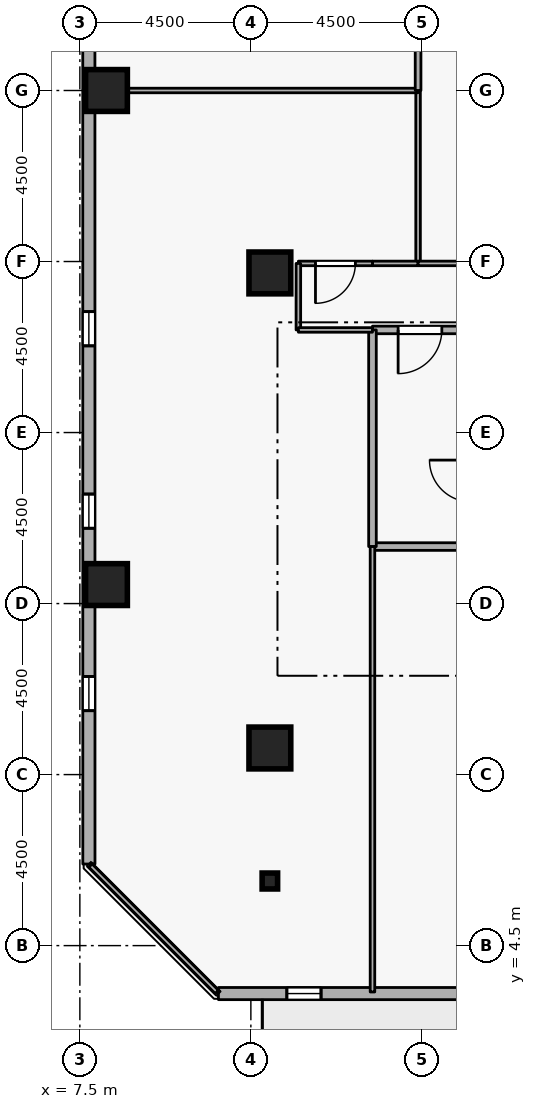
"""IFC4 building model, lengths in metres.
Left out: names, types, materials, properties, quantities, classifications, styles, units other than length and angle.
Written with IfcOpenShell. Run it as: python <this file> out.ifc"""

import sys

from ifc_helpers import new_model, si_unit, direction, frame, frame_2d, origin, origin_2d, place, context, subcontext, project, spatial, rectangle, i_section, extrude, element, fill, save


model = new_model("IFC4")
c1 = context("Model", 3, precision=1e-05, world=origin(), true_north=direction((0.0, 1.0)))
c2 = subcontext(c1, "Body", "Model", "MODEL_VIEW")
j1 = project(units=[si_unit("LENGTHUNIT", "METRE"), si_unit("PLANEANGLEUNIT", "RADIAN")], contexts=[c1])
p1 = place(None, origin())
s1 = spatial("IfcSite", under=j1, at=p1, CompositionType="ELEMENT")
p2 = place(p1, origin())
s2 = spatial("IfcBuilding", under=s1, at=p2, CompositionType="ELEMENT")
p3 = place(p2, frame((0.0, 0.0, 159.9)))
s3 = spatial("IfcBuildingStorey", under=s2, at=p3, CompositionType="ELEMENT", Elevation=159.9)
for number, where, z_axis, x_axis in (
    (1, (12.5, 9.7, 0.0), (0.0, 0.0, 1.0), (1.0, 0.0, 0.0)),
    (2, (8.2, 14.0, 0.0), (0.0, 0.0, 1.0), (1.0, 0.0, 0.0)),
    (3, (8.2, 27.0, 0.0), (0.0, 0.0, 1.0), (1.0, 0.0, 0.0)),
    (4, (12.5, 22.2, 0.0), (0.0, 0.0, 1.0), (1.0, 0.0, 0.0)),
):
    element("IfcColumn", number, at=place(p3, frame(where, z_axis=z_axis, x_axis=x_axis)), inside=s3, PredefinedType="COLUMN", context=c2, shape_type="SweptSolid", body=[
        extrude(rectangle(XDim=1.1, YDim=1.1, at=origin_2d()), origin(), (0.0, 0.0, 1.0), 3.6),
    ])
p4 = place(p3, frame((12.5, 6.2, 0.0), z_axis=(0.0, 0.0, 1.0), x_axis=(1.0, 0.0, 0.0)))
e5 = element("IfcColumn", 5, at=p4, inside=s3, PredefinedType="COLUMN", context=c2, shape_type="SweptSolid", body=[
    extrude(i_section(OverallWidth=0.407, OverallDepth=0.419, WebThickness=0.031, FlangeThickness=0.049, FilletRadius=0.015, at=origin_2d()), origin(), (0.0, 0.0, 1.0), 3.6),
])
p5 = place(p3, frame((11.146, 3.238, 0.0), z_axis=(0.0, 0.0, 1.0), x_axis=(0.999999997144, -7.5574884e-05, 0.0)))
e6 = element("IfcWall", 6, at=p5, inside=s3, PredefinedType="STANDARD", context=c2, shape_type="SweptSolid", body=[
    extrude(rectangle(XDim=35.535, YDim=0.32, at=frame_2d((17.768, 0.0))), origin(), (0.0, 0.0, 1.0), 2.7),
])
p6 = place(p5, frame((22.718, 0.0, 0.0)))
e7 = element("IfcOpeningElement", 7, at=p6, cuts=e6, PredefinedType="OPENING", context=c2, shape_type="SweptSolid", body=[
    extrude(rectangle(XDim=1.0, YDim=2.08, at=frame_2d((0.5, 1.04))), frame((0.0, 0.17, 0.0), z_axis=(0.0, -1.0, 0.0), x_axis=(1.0, 0.0, 0.0)), (0.0, 0.0, 1.0), 0.34),
])
p7 = place(p5, frame((1.8, 0.0, 0.72)))
e8 = element("IfcOpeningElement", 8, at=p7, cuts=e6, PredefinedType="OPENING", context=c2, shape_type="SweptSolid", body=[
    extrude(rectangle(XDim=0.9, YDim=1.75, at=frame_2d((0.45, 0.875))), frame((0.0, 0.17, 0.0), z_axis=(0.0, -1.0, 0.0), x_axis=(1.0, 0.0, 0.0)), (0.0, 0.0, 1.0), 0.34),
])
p8 = place(p5, frame((6.6, 0.0, 0.72)))
e9 = element("IfcOpeningElement", 9, at=p8, cuts=e6, PredefinedType="OPENING", context=c2, shape_type="SweptSolid", body=[
    extrude(rectangle(XDim=0.9, YDim=1.75, at=frame_2d((0.45, 0.875))), frame((0.0, 0.17, 0.0), z_axis=(0.0, -1.0, 0.0), x_axis=(1.0, 0.0, 0.0)), (0.0, 0.0, 1.0), 0.34),
])
p9 = place(p5, frame((11.4, 0.0, 0.72)))
e10 = element("IfcOpeningElement", 10, at=p9, cuts=e6, PredefinedType="OPENING", context=c2, shape_type="SweptSolid", body=[
    extrude(rectangle(XDim=0.9, YDim=1.75, at=frame_2d((0.45, 0.875))), frame((0.0, 0.17, 0.0), z_axis=(0.0, -1.0, 0.0), x_axis=(1.0, 0.0, 0.0)), (0.0, 0.0, 1.0), 0.34),
])
p10 = place(p5, frame((16.2, 0.0, 0.72)))
e11 = element("IfcOpeningElement", 11, at=p10, cuts=e6, PredefinedType="OPENING", context=c2, shape_type="SweptSolid", body=[
    extrude(rectangle(XDim=0.9, YDim=1.75, at=frame_2d((0.45, 0.875))), frame((0.0, 0.17, 0.0), z_axis=(0.0, -1.0, 0.0), x_axis=(1.0, 0.0, 0.0)), (0.0, 0.0, 1.0), 0.34),
])
p11 = place(p5, frame((21.0, 0.0, 0.72)))
e12 = element("IfcOpeningElement", 12, at=p11, cuts=e6, PredefinedType="OPENING", context=c2, shape_type="SweptSolid", body=[
    extrude(rectangle(XDim=0.9, YDim=1.75, at=frame_2d((0.45, 0.875))), frame((0.0, 0.17, 0.0), z_axis=(0.0, -1.0, 0.0), x_axis=(1.0, 0.0, 0.0)), (0.0, 0.0, 1.0), 0.34),
])
p12 = place(p5, frame((25.8, 0.0, 0.72)))
e13 = element("IfcOpeningElement", 13, at=p12, cuts=e6, PredefinedType="OPENING", context=c2, shape_type="SweptSolid", body=[
    extrude(rectangle(XDim=0.9, YDim=1.75, at=frame_2d((0.45, 0.875))), frame((0.0, 0.17, 0.0), z_axis=(0.0, -1.0, 0.0), x_axis=(1.0, 0.0, 0.0)), (0.0, 0.0, 1.0), 0.34),
])
p13 = place(p5, frame((30.6, 0.0, 0.72)))
e14 = element("IfcOpeningElement", 14, at=p13, cuts=e6, PredefinedType="OPENING", context=c2, shape_type="SweptSolid", body=[
    extrude(rectangle(XDim=0.9, YDim=1.75, at=frame_2d((0.45, 0.875))), frame((0.0, 0.17, 0.0), z_axis=(0.0, -1.0, 0.0), x_axis=(1.0, 0.0, 0.0)), (0.0, 0.0, 1.0), 0.34),
])
p14 = place(p3, frame((7.735, 42.181, 0.0), z_axis=(0.0, 0.0, 1.0), x_axis=(7.5574884e-05, -0.999999997144, 0.0)))
e15 = element("IfcWall", 15, at=p14, inside=s3, PredefinedType="STANDARD", context=c2, shape_type="SweptSolid", body=[
    extrude(rectangle(XDim=35.535, YDim=0.32, at=frame_2d((17.768, 0.0))), origin(), (0.0, 0.0, 1.0), 2.7),
])
p15 = place(p14, frame((6.6, 0.0, 0.72)))
e16 = element("IfcOpeningElement", 16, at=p15, cuts=e15, PredefinedType="OPENING", context=c2, shape_type="SweptSolid", body=[
    extrude(rectangle(XDim=0.9, YDim=1.75, at=frame_2d((0.45, 0.875))), frame((0.0, 0.17, 0.0), z_axis=(0.0, -1.0, 0.0), x_axis=(1.0, 0.0, 0.0)), (0.0, 0.0, 1.0), 0.34),
])
p16 = place(p14, frame((11.4, 0.0, 0.72)))
e17 = element("IfcOpeningElement", 17, at=p16, cuts=e15, PredefinedType="OPENING", context=c2, shape_type="SweptSolid", body=[
    extrude(rectangle(XDim=0.9, YDim=1.75, at=frame_2d((0.45, 0.875))), frame((0.0, 0.17, 0.0), z_axis=(0.0, -1.0, 0.0), x_axis=(1.0, 0.0, 0.0)), (0.0, 0.0, 1.0), 0.34),
])
p17 = place(p14, frame((21.0, 0.0, 0.72)))
e18 = element("IfcOpeningElement", 18, at=p17, cuts=e15, PredefinedType="OPENING", context=c2, shape_type="SweptSolid", body=[
    extrude(rectangle(XDim=0.9, YDim=1.75, at=frame_2d((0.45, 0.875))), frame((0.0, 0.17, 0.0), z_axis=(0.0, -1.0, 0.0), x_axis=(1.0, 0.0, 0.0)), (0.0, 0.0, 1.0), 0.34),
])
p18 = place(p14, frame((25.8, 0.0, 0.72)))
e19 = element("IfcOpeningElement", 19, at=p18, cuts=e15, PredefinedType="OPENING", context=c2, shape_type="SweptSolid", body=[
    extrude(rectangle(XDim=0.9, YDim=1.75, at=frame_2d((0.45, 0.875))), frame((0.0, 0.17, 0.0), z_axis=(0.0, -1.0, 0.0), x_axis=(1.0, 0.0, 0.0)), (0.0, 0.0, 1.0), 0.34),
])
p19 = place(p14, frame((30.6, 0.0, 0.72)))
e20 = element("IfcOpeningElement", 20, at=p19, cuts=e15, PredefinedType="OPENING", context=c2, shape_type="SweptSolid", body=[
    extrude(rectangle(XDim=0.9, YDim=1.75, at=frame_2d((0.45, 0.875))), frame((0.0, 0.17, 0.0), z_axis=(0.0, -1.0, 0.0), x_axis=(1.0, 0.0, 0.0)), (0.0, 0.0, 1.0), 0.34),
])
p20 = place(p3, frame((15.2, 15.0, 0.0), z_axis=(0.0, 0.0, 1.0), x_axis=(1.0, 0.0, 0.0)))
e21 = element("IfcWall", 21, at=p20, inside=s3, PredefinedType="STANDARD", context=c2, shape_type="SweptSolid", body=[
    extrude(rectangle(XDim=2.5, YDim=0.2, at=frame_2d((1.25, 0.0))), origin(), (0.0, 0.0, 1.0), 3.34),
])
p21 = place(p3, frame((17.7, 20.7, 0.0), z_axis=(0.0, 0.0, 1.0), x_axis=(-1.0, 0.0, 0.0)))
e22 = element("IfcWall", 22, at=p21, inside=s3, PredefinedType="STANDARD", context=c2, shape_type="SweptSolid", body=[
    extrude(rectangle(XDim=2.5, YDim=0.2, at=frame_2d((1.25, 0.0))), origin(), (0.0, 0.0, 1.0), 3.34),
])
p22 = place(p21, frame((0.675, 0.0, 0.0)))
e23 = element("IfcOpeningElement", 23, at=p22, cuts=e22, PredefinedType="OPENING", context=c2, shape_type="SweptSolid", body=[
    extrude(rectangle(XDim=1.15, YDim=2.1, at=frame_2d((0.575, 1.05))), frame((0.0, 0.11, 0.0), z_axis=(0.0, -1.0, 0.0), x_axis=(1.0, 0.0, 0.0)), (0.0, 0.0, 1.0), 0.22),
])
p23 = place(p3, frame((15.2, 20.7, 0.0), z_axis=(0.0, 0.0, 1.0), x_axis=(0.0, -1.0, 0.0)))
e24 = element("IfcWall", 24, at=p23, inside=s3, PredefinedType="STANDARD", context=c2, shape_type="SweptSolid", body=[
    extrude(rectangle(XDim=5.7, YDim=0.2, at=frame_2d((2.85, 0.0))), origin(), (0.0, 0.0, 1.0), 3.34),
])
p24 = place(p3, frame((16.4, 27.0, 0.0), z_axis=(0.0, 0.0, 1.0), x_axis=(0.0, -1.0, 0.0)))
e25 = element("IfcWall", 25, at=p24, inside=s3, PredefinedType="PARTITIONING", context=c2, shape_type="SweptSolid", body=[
    extrude(rectangle(XDim=4.55, YDim=0.12, at=frame_2d((2.275, 0.0))), origin(), (0.0, 0.0, 1.0), 3.34),
])
p25 = place(p3, frame((16.4, 22.45, 0.0), z_axis=(0.0, 0.0, 1.0), x_axis=(-1.0, 0.0, 0.0)))
e26 = element("IfcWall", 26, at=p25, inside=s3, PredefinedType="PARTITIONING", context=c2, shape_type="SweptSolid", body=[
    extrude(rectangle(XDim=1.2, YDim=0.12, at=frame_2d((0.6, 0.0))), origin(), (0.0, 0.0, 1.0), 3.34),
])
p26 = place(p3, frame((15.2, 22.45, 0.0), z_axis=(0.0, 0.0, 1.0), x_axis=(-1.0, 0.0, 0.0)))
e27 = element("IfcWall", 27, at=p26, inside=s3, PredefinedType="PARTITIONING", context=c2, shape_type="SweptSolid", body=[
    extrude(rectangle(XDim=1.95, YDim=0.12, at=frame_2d((0.975, 0.0))), origin(), (0.0, 0.0, 1.0), 3.34),
])
p27 = place(p26, frame((0.45, 0.0, 0.0)))
e28 = element("IfcOpeningElement", 28, at=p27, cuts=e27, PredefinedType="OPENING", context=c2, shape_type="SweptSolid", body=[
    extrude(rectangle(XDim=1.05, YDim=2.1, at=frame_2d((0.525, 1.05))), frame((0.0, 0.07, 0.0), z_axis=(0.0, -1.0, 0.0), x_axis=(1.0, 0.0, 0.0)), (0.0, 0.0, 1.0), 0.14),
])
p28 = place(p3, frame((13.25, 22.45, 0.0), z_axis=(0.0, 0.0, 1.0), x_axis=(0.0, -1.0, 0.0)))
e29 = element("IfcWall", 29, at=p28, inside=s3, PredefinedType="PARTITIONING", context=c2, shape_type="SweptSolid", body=[
    extrude(rectangle(XDim=1.75, YDim=0.12, at=frame_2d((0.875, 0.0))), origin(), (0.0, 0.0, 1.0), 3.34),
])
p29 = place(p3, frame((13.25, 20.7, 0.0), z_axis=(0.0, 0.0, 1.0), x_axis=(1.0, 0.0, 0.0)))
e30 = element("IfcWall", 30, at=p29, inside=s3, PredefinedType="PARTITIONING", context=c2, shape_type="SweptSolid", body=[
    extrude(rectangle(XDim=1.95, YDim=0.12, at=frame_2d((0.975, 0.0))), origin(), (0.0, 0.0, 1.0), 3.34),
])
p30 = place(p3, frame((15.2, 15.0, 0.0), z_axis=(0.0, 0.0, 1.0), x_axis=(0.0, -1.0, 0.0)))
e31 = element("IfcWall", 31, at=p30, inside=s3, PredefinedType="PARTITIONING", context=c2, shape_type="SweptSolid", body=[
    extrude(rectangle(XDim=11.72, YDim=0.12, at=frame_2d((5.86, 0.0))), origin(), (0.0, 0.0, 1.0), 3.34),
])
p31 = place(p3, frame((11.106, 3.28, 0.0), z_axis=(0.0, 0.0, 1.0), x_axis=(-0.707106781187, 0.707106781187, 0.0)))
e32 = element("IfcWall", 32, at=p31, inside=s3, PredefinedType="PARTITIONING", context=c2, shape_type="SweptSolid", body=[
    extrude(rectangle(XDim=4.703, YDim=0.12, at=frame_2d((2.352, 0.0))), origin(), (0.0, 0.0, 1.0), 3.34),
])
p32 = place(p3, frame((7.78, 27.0, 0.0), z_axis=(0.0, 0.0, 1.0), x_axis=(1.0, 0.0, 0.0)))
e33 = element("IfcWall", 33, at=p32, inside=s3, PredefinedType="PARTITIONING", context=c2, shape_type="SweptSolid", body=[
    extrude(rectangle(XDim=8.62, YDim=0.12, at=frame_2d((4.31, 0.0))), origin(), (0.0, 0.0, 1.0), 2.878),
])
p33 = place(p3, frame((16.4, 31.55, 0.0), z_axis=(0.0, 0.0, 1.0), x_axis=(0.0, -1.0, 0.0)))
e34 = element("IfcWall", 34, at=p33, inside=s3, PredefinedType="PARTITIONING", context=c2, shape_type="SweptSolid", body=[
    extrude(rectangle(XDim=4.55, YDim=0.15, at=frame_2d((2.275, 0.0))), origin(), (0.0, 0.0, 1.0), 3.34),
])
p34 = place(p3, frame((20.9, 22.45, 0.0), z_axis=(0.0, 0.0, 1.0), x_axis=(-1.0, 0.0, 0.0)))
e35 = element("IfcWall", 35, at=p34, inside=s3, PredefinedType="PARTITIONING", context=c2, shape_type="SweptSolid", body=[
    extrude(rectangle(XDim=4.5, YDim=0.12, at=frame_2d((2.25, 0.0))), origin(), (0.0, 0.0, 1.0), 3.34),
])
p35 = place(p7, origin())
e36 = element("IfcWindow", 36, at=p35, inside=s3, PartitioningType="SINGLE_PANEL", PredefinedType="WINDOW", context=c2, shape_type="SweptSolid", body=[
    extrude(rectangle(XDim=0.9, YDim=1.75, at=frame_2d((0.45, 0.875))), frame((0.0, 0.03, 0.0), z_axis=(0.0, -1.0, 0.0), x_axis=(1.0, 0.0, 0.0)), (0.0, 0.0, 1.0), 0.06),
])
fill(e8, e36)
p36 = place(p17, origin())
e37 = element("IfcWindow", 37, at=p36, inside=s3, PartitioningType="SINGLE_PANEL", PredefinedType="WINDOW", context=c2, shape_type="SweptSolid", body=[
    extrude(rectangle(XDim=0.9, YDim=1.75, at=frame_2d((0.45, 0.875))), frame((0.0, 0.03, 0.0), z_axis=(0.0, -1.0, 0.0), x_axis=(1.0, 0.0, 0.0)), (0.0, 0.0, 1.0), 0.06),
])
fill(e18, e37)
p37 = place(p18, origin())
e38 = element("IfcWindow", 38, at=p37, inside=s3, PartitioningType="SINGLE_PANEL", PredefinedType="WINDOW", context=c2, shape_type="SweptSolid", body=[
    extrude(rectangle(XDim=0.9, YDim=1.75, at=frame_2d((0.45, 0.875))), frame((0.0, 0.03, 0.0), z_axis=(0.0, -1.0, 0.0), x_axis=(1.0, 0.0, 0.0)), (0.0, 0.0, 1.0), 0.06),
])
fill(e19, e38)
p38 = place(p19, origin())
e39 = element("IfcWindow", 39, at=p38, inside=s3, PartitioningType="SINGLE_PANEL", PredefinedType="WINDOW", context=c2, shape_type="SweptSolid", body=[
    extrude(rectangle(XDim=0.9, YDim=1.75, at=frame_2d((0.45, 0.875))), frame((0.0, 0.03, 0.0), z_axis=(0.0, -1.0, 0.0), x_axis=(1.0, 0.0, 0.0)), (0.0, 0.0, 1.0), 0.06),
])
fill(e20, e39)
p39 = place(p22, origin())
e40 = element("IfcDoor", 40, at=p39, inside=s3, OperationType="SINGLE_SWING_RIGHT", PredefinedType="DOOR", context=c2, shape_type="SweptSolid", body=[
    extrude(rectangle(XDim=1.15, YDim=2.1, at=frame_2d((0.575, 1.05))), frame((0.0, 0.025, 0.0), z_axis=(0.0, -1.0, 0.0), x_axis=(1.0, 0.0, 0.0)), (0.0, 0.0, 1.0), 0.05),
])
fill(e23, e40)
p40 = place(p27, origin())
e41 = element("IfcDoor", 41, at=p40, inside=s3, OperationType="SINGLE_SWING_RIGHT", PredefinedType="DOOR", context=c2, shape_type="SweptSolid", body=[
    extrude(rectangle(XDim=1.05, YDim=2.1, at=frame_2d((0.525, 1.05))), frame((0.0, 0.025, 0.0), z_axis=(0.0, -1.0, 0.0), x_axis=(1.0, 0.0, 0.0)), (0.0, 0.0, 1.0), 0.05),
])
fill(e28, e41)
save(model, sys.argv[1])
